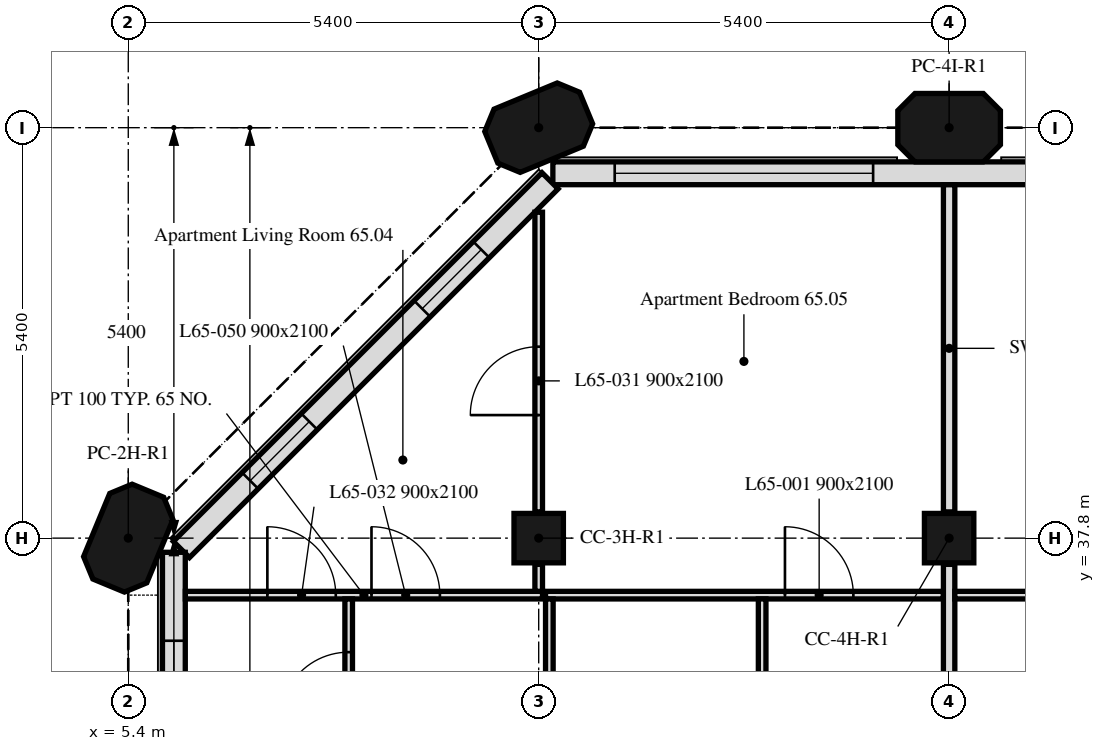
"""IFC4 building model, lengths in metres.
Left out: names, types, materials, properties, quantities, classifications, styles, units other than length and angle.
Written with IfcOpenShell. Run it as: python <this file> out.ifc"""

import sys

from ifc_helpers import new_model, si_unit, direction, frame, frame_2d, origin, origin_2d, place, context, subcontext, project, spatial, polyline, rectangle, outline, extrude, element, fill, save


model = new_model("IFC4")
c1 = context("Model", 3, precision=1e-05, world=origin(), true_north=direction((0.0, 1.0)))
c2 = subcontext(c1, "Body", "Model", "MODEL_VIEW")
j1 = project(units=[si_unit("LENGTHUNIT", "METRE"), si_unit("PLANEANGLEUNIT", "RADIAN")], contexts=[c1])
p1 = place(None, origin())
s1 = spatial("IfcSite", under=j1, at=p1, CompositionType="ELEMENT")
p2 = place(p1, origin())
s2 = spatial("IfcBuilding", under=s1, at=p2, CompositionType="ELEMENT")
p3 = place(p2, frame((0.0, 0.0, 268.6)))
s3 = spatial("IfcBuildingStorey", under=s2, at=p3, CompositionType="ELEMENT", Elevation=268.6)
p4 = place(p3, frame((5.4, 37.8, 0.0), z_axis=(0.0, 0.0, 1.0), x_axis=(0.382683432365, 0.923879532511, 0.0)))
e1 = element("IfcColumn", 1, at=p4, inside=s3, PredefinedType="COLUMN", context=c2, shape_type="SweptSolid", body=[
    extrude(outline(polyline([(-0.45, -0.45), (0.45, -0.45), (0.675, -0.225), (0.675, 0.225), (0.45, 0.45), (-0.45, 0.45), (-0.675, 0.225), (-0.675, -0.225), (-0.45, -0.45)])), origin(), (0.0, 0.0, 1.0), 3.0),
])
for number, where, z_axis, x_axis in (
    (2, (10.8, 37.8, 0.0), (0.0, 0.0, 1.0), (1.0, 0.0, 0.0)),
    (3, (16.2, 37.8, 0.0), (0.0, 0.0, 1.0), (1.0, 0.0, 0.0)),
):
    element("IfcColumn", number, at=place(p3, frame(where, z_axis=z_axis, x_axis=x_axis)), inside=s3, PredefinedType="COLUMN", context=c2, shape_type="SweptSolid", body=[
        extrude(rectangle(XDim=0.65, YDim=0.65, at=origin_2d()), origin(), (0.0, 0.0, 1.0), 3.0),
    ])
for number, where, z_axis, x_axis in (
    (4, (10.8, 43.2, 0.0), (0.0, 0.0, 1.0), (0.924, 0.383, 0.0)),
    (5, (16.2, 43.2, 0.0), (0.0, 0.0, 1.0), (1.0, 0.0, 0.0)),
):
    element("IfcColumn", number, at=place(p3, frame(where, z_axis=z_axis, x_axis=x_axis)), inside=s3, PredefinedType="COLUMN", context=c2, shape_type="SweptSolid", body=[
        extrude(outline(polyline([(-0.45, -0.45), (0.45, -0.45), (0.675, -0.225), (0.675, 0.225), (0.45, 0.45), (-0.45, 0.45), (-0.675, 0.225), (-0.675, -0.225), (-0.45, -0.45)])), origin(), (0.0, 0.0, 1.0), 3.0),
    ])
p5 = place(p3, frame((43.014, 42.6, 0.0), z_axis=(0.0, 0.0, 1.0), x_axis=(-1.0, 0.0, 0.0)))
e6 = element("IfcWall", 6, at=p5, inside=s3, PredefinedType="SOLIDWALL", context=c2, shape_type="SweptSolid", body=[
    extrude(rectangle(XDim=32.027, YDim=0.3, at=frame_2d((16.014, 0.0))), origin(), (0.0, 0.0, 1.0), 3.0),
])
p6 = place(p5, frame((2.764, 0.0, 0.9)))
e7 = element("IfcOpeningElement", 7, at=p6, cuts=e6, PredefinedType="OPENING", context=c2, shape_type="SweptSolid", body=[
    extrude(rectangle(XDim=1.1, YDim=1.7, at=frame_2d((0.55, 0.85))), frame((0.0, 0.16, 0.0), z_axis=(0.0, -1.0, 0.0), x_axis=(1.0, 0.0, 0.0)), (0.0, 0.0, 1.0), 0.32),
])
p7 = place(p5, frame((6.214, 0.0, 0.9)))
e8 = element("IfcOpeningElement", 8, at=p7, cuts=e6, PredefinedType="OPENING", context=c2, shape_type="SweptSolid", body=[
    extrude(rectangle(XDim=3.4, YDim=1.7, at=frame_2d((1.7, 0.85))), frame((0.0, 0.16, 0.0), z_axis=(0.0, -1.0, 0.0), x_axis=(1.0, 0.0, 0.0)), (0.0, 0.0, 1.0), 0.32),
])
p8 = place(p5, frame((13.564, 0.0, 0.9)))
e9 = element("IfcOpeningElement", 9, at=p8, cuts=e6, PredefinedType="OPENING", context=c2, shape_type="SweptSolid", body=[
    extrude(rectangle(XDim=1.1, YDim=1.7, at=frame_2d((0.55, 0.85))), frame((0.0, 0.16, 0.0), z_axis=(0.0, -1.0, 0.0), x_axis=(1.0, 0.0, 0.0)), (0.0, 0.0, 1.0), 0.32),
])
p9 = place(p5, frame((17.014, 0.0, 0.9)))
e10 = element("IfcOpeningElement", 10, at=p9, cuts=e6, PredefinedType="OPENING", context=c2, shape_type="SweptSolid", body=[
    extrude(rectangle(XDim=3.4, YDim=1.7, at=frame_2d((1.7, 0.85))), frame((0.0, 0.16, 0.0), z_axis=(0.0, -1.0, 0.0), x_axis=(1.0, 0.0, 0.0)), (0.0, 0.0, 1.0), 0.32),
])
p10 = place(p5, frame((24.364, 0.0, 0.9)))
e11 = element("IfcOpeningElement", 11, at=p10, cuts=e6, PredefinedType="OPENING", context=c2, shape_type="SweptSolid", body=[
    extrude(rectangle(XDim=1.1, YDim=1.7, at=frame_2d((0.55, 0.85))), frame((0.0, 0.16, 0.0), z_axis=(0.0, -1.0, 0.0), x_axis=(1.0, 0.0, 0.0)), (0.0, 0.0, 1.0), 0.32),
])
p11 = place(p5, frame((27.814, 0.0, 0.9)))
e12 = element("IfcOpeningElement", 12, at=p11, cuts=e6, PredefinedType="OPENING", context=c2, shape_type="SweptSolid", body=[
    extrude(rectangle(XDim=3.4, YDim=1.7, at=frame_2d((1.7, 0.85))), frame((0.0, 0.16, 0.0), z_axis=(0.0, -1.0, 0.0), x_axis=(1.0, 0.0, 0.0)), (0.0, 0.0, 1.0), 0.32),
])
p12 = place(p3, frame((10.949, 42.501, 0.0), z_axis=(0.0, 0.0, 1.0), x_axis=(-0.707106781187, -0.707106781187, 0.0)))
e13 = element("IfcWall", 13, at=p12, inside=s3, PredefinedType="SOLIDWALL", context=c2, shape_type="SweptSolid", body=[
    extrude(rectangle(XDim=6.86, YDim=0.3, at=frame_2d((3.43, 0.0))), origin(), (0.0, 0.0, 1.0), 3.0),
])
p13 = place(p12, frame((1.28, 0.0, 0.9)))
e14 = element("IfcOpeningElement", 14, at=p13, cuts=e13, PredefinedType="OPENING", context=c2, shape_type="SweptSolid", body=[
    extrude(rectangle(XDim=1.1, YDim=1.7, at=frame_2d((0.55, 0.85))), frame((0.0, 0.16, 0.0), z_axis=(0.0, -1.0, 0.0), x_axis=(1.0, 0.0, 0.0)), (0.0, 0.0, 1.0), 0.32),
])
p14 = place(p12, frame((4.48, 0.0, 0.9)))
e15 = element("IfcOpeningElement", 15, at=p14, cuts=e13, PredefinedType="OPENING", context=c2, shape_type="SweptSolid", body=[
    extrude(rectangle(XDim=1.1, YDim=1.7, at=frame_2d((0.55, 0.85))), frame((0.0, 0.16, 0.0), z_axis=(0.0, -1.0, 0.0), x_axis=(1.0, 0.0, 0.0)), (0.0, 0.0, 1.0), 0.32),
])
p15 = place(p3, frame((6.0, 37.614, 0.0), z_axis=(0.0, 0.0, 1.0), x_axis=(0.0, -1.0, 0.0)))
e16 = element("IfcWall", 16, at=p15, inside=s3, PredefinedType="SOLIDWALL", context=c2, shape_type="SweptSolid", body=[
    extrude(rectangle(XDim=5.214, YDim=0.3, at=frame_2d((2.607, 0.0))), origin(), (0.0, 0.0, 1.0), 3.0),
])
p16 = place(p15, frame((1.164, 0.0, 0.9)))
e17 = element("IfcOpeningElement", 17, at=p16, cuts=e16, PredefinedType="OPENING", context=c2, shape_type="SweptSolid", body=[
    extrude(rectangle(XDim=1.1, YDim=1.7, at=frame_2d((0.55, 0.85))), frame((0.0, 0.16, 0.0), z_axis=(0.0, -1.0, 0.0), x_axis=(1.0, 0.0, 0.0)), (0.0, 0.0, 1.0), 0.32),
])
p17 = place(p15, frame((3.139, 0.0, 0.9)))
e18 = element("IfcOpeningElement", 18, at=p17, cuts=e16, PredefinedType="OPENING", context=c2, shape_type="SweptSolid", body=[
    extrude(rectangle(XDim=0.65, YDim=1.7, at=frame_2d((0.325, 0.85))), frame((0.0, 0.16, 0.0), z_axis=(0.0, -1.0, 0.0), x_axis=(1.0, 0.0, 0.0)), (0.0, 0.0, 1.0), 0.32),
])
p18 = place(p3, frame((6.151, 37.05, 0.0), z_axis=(0.0, 0.0, 1.0), x_axis=(1.0, 0.0, 0.0)))
e19 = element("IfcWall", 19, at=p18, inside=s3, PredefinedType="PARTITIONING", context=c2, shape_type="SweptSolid", body=[
    extrude(rectangle(XDim=4.699, YDim=0.1, at=frame_2d((2.35, 0.0))), origin(), (0.0, 0.0, 1.0), 3.0),
])
p19 = place(p18, frame((1.079, 0.0, 0.0)))
e20 = element("IfcOpeningElement", 20, at=p19, cuts=e19, PredefinedType="OPENING", context=c2, shape_type="SweptSolid", body=[
    extrude(rectangle(XDim=0.9, YDim=2.1, at=frame_2d((0.45, 1.05))), frame((0.0, 0.05, 0.0), z_axis=(0.0, -1.0, 0.0), x_axis=(1.0, 0.0, 0.0)), (0.0, 0.0, 1.0), 0.1),
])
p20 = place(p18, frame((2.449, 0.0, 0.0)))
e21 = element("IfcOpeningElement", 21, at=p20, cuts=e19, PredefinedType="OPENING", context=c2, shape_type="SweptSolid", body=[
    extrude(rectangle(XDim=0.9, YDim=2.1, at=frame_2d((0.45, 1.05))), frame((0.0, 0.05, 0.0), z_axis=(0.0, -1.0, 0.0), x_axis=(1.0, 0.0, 0.0)), (0.0, 0.0, 1.0), 0.1),
])
p21 = place(p3, frame((10.8, 37.1, 0.0), z_axis=(0.0, 0.0, 1.0), x_axis=(0.0, 1.0, 0.0)))
e22 = element("IfcWall", 22, at=p21, inside=s3, PredefinedType="PARTITIONING", context=c2, shape_type="SweptSolid", body=[
    extrude(rectangle(XDim=0.355, YDim=0.1, at=frame_2d((0.177, 0.0))), origin(), (0.0, 0.0, 1.0), 3.0),
])
p22 = place(p3, frame((10.8, 38.145, 0.0), z_axis=(0.0, 0.0, 1.0), x_axis=(0.0, 1.0, 0.0)))
e23 = element("IfcWall", 23, at=p22, inside=s3, PredefinedType="PARTITIONING", context=c2, shape_type="SweptSolid", body=[
    extrude(rectangle(XDim=3.943, YDim=0.1, at=frame_2d((1.971, 0.0))), origin(), (0.0, 0.0, 1.0), 3.0),
])
p23 = place(p22, frame((1.274, 0.0, 0.0)))
e24 = element("IfcOpeningElement", 24, at=p23, cuts=e23, PredefinedType="OPENING", context=c2, shape_type="SweptSolid", body=[
    extrude(rectangle(XDim=0.9, YDim=2.1, at=frame_2d((0.45, 1.05))), frame((0.0, 0.05, 0.0), z_axis=(0.0, -1.0, 0.0), x_axis=(1.0, 0.0, 0.0)), (0.0, 0.0, 1.0), 0.1),
])
p24 = place(p3, frame((10.89, 37.05, 0.0), z_axis=(0.0, 0.0, 1.0), x_axis=(1.0, 0.0, 0.0)))
e25 = element("IfcWall", 25, at=p24, inside=s3, PredefinedType="PARTITIONING", context=c2, shape_type="SweptSolid", body=[
    extrude(rectangle(XDim=5.235, YDim=0.1, at=frame_2d((2.618, 0.0))), origin(), (0.0, 0.0, 1.0), 3.0),
])
p25 = place(p24, frame((3.15, 0.0, 0.0)))
e26 = element("IfcOpeningElement", 26, at=p25, cuts=e25, PredefinedType="OPENING", context=c2, shape_type="SweptSolid", body=[
    extrude(rectangle(XDim=0.9, YDim=2.1, at=frame_2d((0.45, 1.05))), frame((0.0, 0.05, 0.0), z_axis=(0.0, -1.0, 0.0), x_axis=(1.0, 0.0, 0.0)), (0.0, 0.0, 1.0), 0.1),
])
p26 = place(p3, frame((16.2, 38.145, 0.0), z_axis=(0.0, 0.0, 1.0), x_axis=(0.0, 1.0, 0.0)))
e27 = element("IfcWall", 27, at=p26, inside=s3, PredefinedType="PARTITIONING", context=c2, shape_type="SweptSolid", body=[
    extrude(rectangle(XDim=4.304, YDim=0.15, at=frame_2d((2.152, 0.0))), origin(), (0.0, 0.0, 1.0), 3.0),
])
p27 = place(p3, frame((8.3, 34.725, 0.0), z_axis=(0.0, 0.0, 1.0), x_axis=(0.0, 1.0, 0.0)))
e28 = element("IfcWall", 28, at=p27, inside=s3, PredefinedType="PARTITIONING", context=c2, shape_type="SweptSolid", body=[
    extrude(rectangle(XDim=2.275, YDim=0.1, at=frame_2d((1.137, 0.0))), origin(), (0.0, 0.0, 1.0), 3.0),
])
p28 = place(p27, frame((0.675, 0.0, 0.0)))
e29 = element("IfcOpeningElement", 29, at=p28, cuts=e28, PredefinedType="OPENING", context=c2, shape_type="SweptSolid", body=[
    extrude(rectangle(XDim=0.9, YDim=2.1, at=frame_2d((0.45, 1.05))), frame((0.0, 0.05, 0.0), z_axis=(0.0, -1.0, 0.0), x_axis=(1.0, 0.0, 0.0)), (0.0, 0.0, 1.0), 0.1),
])
p29 = place(p3, frame((10.94, 34.725, 0.0), z_axis=(0.0, 0.0, 1.0), x_axis=(0.0, 1.0, 0.0)))
e30 = element("IfcWall", 30, at=p29, inside=s3, PredefinedType="PARTITIONING", context=c2, shape_type="SweptSolid", body=[
    extrude(rectangle(XDim=2.275, YDim=0.1, at=frame_2d((1.137, 0.0))), origin(), (0.0, 0.0, 1.0), 3.0),
])
p30 = place(p29, frame((0.25, 0.0, 0.0)))
e31 = element("IfcOpeningElement", 31, at=p30, cuts=e30, PredefinedType="OPENING", context=c2, shape_type="SweptSolid", body=[
    extrude(rectangle(XDim=0.9, YDim=2.1, at=frame_2d((0.45, 1.05))), frame((0.0, 0.05, 0.0), z_axis=(0.0, -1.0, 0.0), x_axis=(1.0, 0.0, 0.0)), (0.0, 0.0, 1.0), 0.1),
])
p31 = place(p3, frame((13.74, 34.725, 0.0), z_axis=(0.0, 0.0, 1.0), x_axis=(0.0, 1.0, 0.0)))
e32 = element("IfcWall", 32, at=p31, inside=s3, PredefinedType="PARTITIONING", context=c2, shape_type="SweptSolid", body=[
    extrude(rectangle(XDim=2.275, YDim=0.1, at=frame_2d((1.137, 0.0))), origin(), (0.0, 0.0, 1.0), 3.0),
])
p32 = place(p3, frame((16.2, 34.725, 0.0), z_axis=(0.0, 0.0, 1.0), x_axis=(0.0, 1.0, 0.0)))
e33 = element("IfcWall", 33, at=p32, inside=s3, PredefinedType="PARTITIONING", context=c2, shape_type="SweptSolid", body=[
    extrude(rectangle(XDim=2.73, YDim=0.15, at=frame_2d((1.365, 0.0))), origin(), (0.0, 0.0, 1.0), 3.0),
])
p33 = place(p3, frame((16.275, 37.05, 0.0), z_axis=(0.0, 0.0, 1.0), x_axis=(1.0, 0.0, 0.0)))
e34 = element("IfcWall", 34, at=p33, inside=s3, PredefinedType="PARTITIONING", context=c2, shape_type="SweptSolid", body=[
    extrude(rectangle(XDim=16.05, YDim=0.1, at=frame_2d((8.025, 0.0))), origin(), (0.0, 0.0, 1.0), 3.0),
])
p34 = place(p33, frame((1.453, 0.0, 0.0)))
e35 = element("IfcOpeningElement", 35, at=p34, cuts=e34, PredefinedType="OPENING", context=c2, shape_type="SweptSolid", body=[
    extrude(rectangle(XDim=0.9, YDim=2.1, at=frame_2d((0.45, 1.05))), frame((0.0, 0.05, 0.0), z_axis=(0.0, -1.0, 0.0), x_axis=(1.0, 0.0, 0.0)), (0.0, 0.0, 1.0), 0.1),
])
p35 = place(p33, frame((12.125, 0.0, 0.0)))
e36 = element("IfcOpeningElement", 36, at=p35, cuts=e34, PredefinedType="OPENING", context=c2, shape_type="SweptSolid", body=[
    extrude(rectangle(XDim=0.9, YDim=2.1, at=frame_2d((0.45, 1.05))), frame((0.0, 0.05, 0.0), z_axis=(0.0, -1.0, 0.0), x_axis=(1.0, 0.0, 0.0)), (0.0, 0.0, 1.0), 0.1),
])
p36 = place(p33, frame((13.625, 0.0, 0.0)))
e37 = element("IfcOpeningElement", 37, at=p36, cuts=e34, PredefinedType="OPENING", context=c2, shape_type="SweptSolid", body=[
    extrude(rectangle(XDim=0.9, YDim=2.1, at=frame_2d((0.45, 1.05))), frame((0.0, 0.05, 0.0), z_axis=(0.0, -1.0, 0.0), x_axis=(1.0, 0.0, 0.0)), (0.0, 0.0, 1.0), 0.1),
])
p37 = place(p33, frame((5.644, 0.0, 0.0)))
e38 = element("IfcOpeningElement", 38, at=p37, cuts=e34, PredefinedType="OPENING", context=c2, shape_type="SweptSolid", body=[
    extrude(rectangle(XDim=0.9, YDim=2.1, at=frame_2d((0.45, 1.05))), frame((0.0, 0.05, 0.0), z_axis=(0.0, -1.0, 0.0), x_axis=(1.0, 0.0, 0.0)), (0.0, 0.0, 1.0), 0.1),
])
p38 = place(p11, origin())
e39 = element("IfcWindow", 39, at=p38, inside=s3, PartitioningType="SINGLE_PANEL", PredefinedType="WINDOW", context=c2, shape_type="SweptSolid", body=[
    extrude(rectangle(XDim=3.4, YDim=1.7, at=frame_2d((1.7, 0.85))), frame((0.0, 0.03, 0.0), z_axis=(0.0, -1.0, 0.0), x_axis=(1.0, 0.0, 0.0)), (0.0, 0.0, 1.0), 0.06),
])
fill(e12, e39)
p39 = place(p13, origin())
e40 = element("IfcWindow", 40, at=p39, inside=s3, PartitioningType="SINGLE_PANEL", PredefinedType="WINDOW", context=c2, shape_type="SweptSolid", body=[
    extrude(rectangle(XDim=1.1, YDim=1.7, at=frame_2d((0.55, 0.85))), frame((0.0, 0.03, 0.0), z_axis=(0.0, -1.0, 0.0), x_axis=(1.0, 0.0, 0.0)), (0.0, 0.0, 1.0), 0.06),
])
fill(e14, e40)
p40 = place(p14, origin())
e41 = element("IfcWindow", 41, at=p40, inside=s3, PartitioningType="SINGLE_PANEL", PredefinedType="WINDOW", context=c2, shape_type="SweptSolid", body=[
    extrude(rectangle(XDim=1.1, YDim=1.7, at=frame_2d((0.55, 0.85))), frame((0.0, 0.03, 0.0), z_axis=(0.0, -1.0, 0.0), x_axis=(1.0, 0.0, 0.0)), (0.0, 0.0, 1.0), 0.06),
])
fill(e15, e41)
p41 = place(p16, origin())
e42 = element("IfcWindow", 42, at=p41, inside=s3, PartitioningType="SINGLE_PANEL", PredefinedType="WINDOW", context=c2, shape_type="SweptSolid", body=[
    extrude(rectangle(XDim=1.1, YDim=1.7, at=frame_2d((0.55, 0.85))), frame((0.0, 0.03, 0.0), z_axis=(0.0, -1.0, 0.0), x_axis=(1.0, 0.0, 0.0)), (0.0, 0.0, 1.0), 0.06),
])
fill(e17, e42)
p42 = place(p25, origin())
e43 = element("IfcDoor", 43, at=p42, inside=s3, OperationType="SINGLE_SWING_RIGHT", PredefinedType="DOOR", context=c2, shape_type="SweptSolid", body=[
    extrude(rectangle(XDim=0.9, YDim=2.1, at=frame_2d((0.45, 1.05))), frame((0.0, 0.025, 0.0), z_axis=(0.0, -1.0, 0.0), x_axis=(1.0, 0.0, 0.0)), (0.0, 0.0, 1.0), 0.05),
])
fill(e26, e43)
p43 = place(p23, origin())
e44 = element("IfcDoor", 44, at=p43, inside=s3, OperationType="SINGLE_SWING_RIGHT", PredefinedType="DOOR", context=c2, shape_type="SweptSolid", body=[
    extrude(rectangle(XDim=0.9, YDim=2.1, at=frame_2d((0.45, 1.05))), frame((0.0, 0.025, 0.0), z_axis=(0.0, -1.0, 0.0), x_axis=(1.0, 0.0, 0.0)), (0.0, 0.0, 1.0), 0.05),
])
fill(e24, e44)
p44 = place(p19, origin())
e45 = element("IfcDoor", 45, at=p44, inside=s3, OperationType="SINGLE_SWING_LEFT", PredefinedType="DOOR", context=c2, shape_type="SweptSolid", body=[
    extrude(rectangle(XDim=0.9, YDim=2.1, at=frame_2d((0.45, 1.05))), frame((0.0, 0.025, 0.0), z_axis=(0.0, -1.0, 0.0), x_axis=(1.0, 0.0, 0.0)), (0.0, 0.0, 1.0), 0.05),
])
fill(e20, e45)
p45 = place(p28, origin())
e46 = element("IfcDoor", 46, at=p45, inside=s3, OperationType="SINGLE_SWING_LEFT", PredefinedType="DOOR", context=c2, shape_type="SweptSolid", body=[
    extrude(rectangle(XDim=0.9, YDim=2.1, at=frame_2d((0.45, 1.05))), frame((0.0, 0.025, 0.0), z_axis=(0.0, -1.0, 0.0), x_axis=(1.0, 0.0, 0.0)), (0.0, 0.0, 1.0), 0.05),
])
fill(e29, e46)
p46 = place(p20, origin())
e47 = element("IfcDoor", 47, at=p46, inside=s3, OperationType="SINGLE_SWING_RIGHT", PredefinedType="DOOR", context=c2, shape_type="SweptSolid", body=[
    extrude(rectangle(XDim=0.9, YDim=2.1, at=frame_2d((0.45, 1.05))), frame((0.0, 0.025, 0.0), z_axis=(0.0, -1.0, 0.0), x_axis=(1.0, 0.0, 0.0)), (0.0, 0.0, 1.0), 0.05),
])
fill(e21, e47)
save(model, sys.argv[1])
